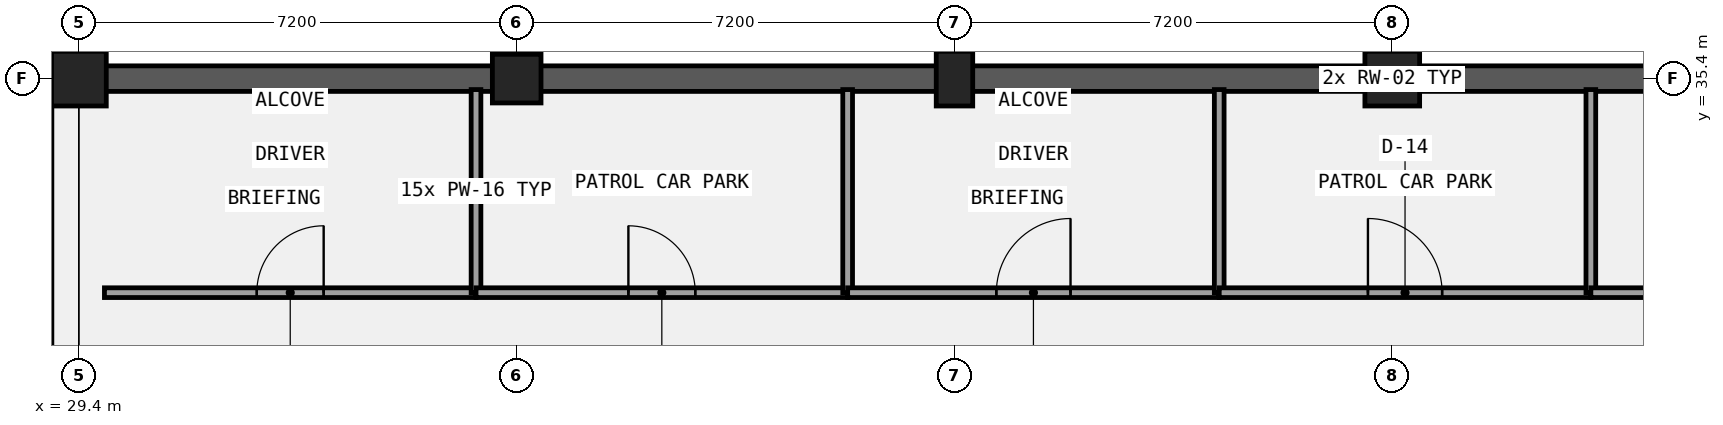
"""IFC4 building model, lengths in metres.
Left out: names, types, materials, properties, quantities, classifications, styles, units other than length and angle.
Written with IfcOpenShell. Run it as: python <this file> out.ifc"""

import sys

from ifc_helpers import new_model, si_unit, direction, frame, frame_2d, origin, origin_2d, place, context, subcontext, project, spatial, rectangle, extrude, element, fill, save


model = new_model("IFC4")
c1 = context("Model", 3, precision=1e-05, world=origin(), true_north=direction((0.0, 1.0)))
c2 = subcontext(c1, "Body", "Model", "MODEL_VIEW")
j1 = project(units=[si_unit("LENGTHUNIT", "METRE"), si_unit("PLANEANGLEUNIT", "RADIAN")], contexts=[c1])
p1 = place(None, origin())
s1 = spatial("IfcSite", under=j1, at=p1, CompositionType="ELEMENT")
p2 = place(p1, origin())
s2 = spatial("IfcBuilding", under=s1, at=p2, CompositionType="ELEMENT")
p3 = place(p2, frame((0.0, 0.0, -4.2)))
s3 = spatial("IfcBuildingStorey", under=s2, at=p3, CompositionType="ELEMENT", Elevation=-4.2)
p4 = place(p3, frame((29.19, 35.4, 0.0), z_axis=(0.0, 0.0, 1.0), x_axis=(1.0, 0.0, 0.0)))
e1 = element("IfcWall", 1, at=p4, inside=s3, PredefinedType="USERDEFINED", context=c2, shape_type="SweptSolid", body=[
    extrude(rectangle(XDim=43.62, YDim=0.42, at=frame_2d((21.81, 0.0))), origin(), (0.0, 0.0, 1.0), 3.03),
])
p5 = place(p3, frame((29.4, 56.8, 0.0), z_axis=(0.0, 0.0, 1.0), x_axis=(0.0, -1.0, 0.0)))
e2 = element("IfcWall", 2, at=p5, inside=s3, PredefinedType="USERDEFINED", context=c2, shape_type="SweptSolid", body=[
    extrude(rectangle(XDim=21.2, YDim=0.42, at=frame_2d((10.6, 0.0))), origin(), (0.0, 0.0, 1.0), 3.03),
])
p6 = place(p3, frame((29.4, 35.4, 0.0), z_axis=(0.0, 0.0, 1.0), x_axis=(1.0, 0.0, 0.0)))
e3 = element("IfcColumn", 3, at=p6, inside=s3, PredefinedType="COLUMN", context=c2, shape_type="SweptSolid", body=[
    extrude(rectangle(XDim=0.9, YDim=0.9, at=origin_2d()), origin(), (0.0, 0.0, 1.0), 4.2),
])
p7 = place(p3, frame((36.6, 35.4, 0.0), z_axis=(0.0, 0.0, 1.0), x_axis=(1.0, 0.0, 0.0)))
e4 = element("IfcColumn", 4, at=p7, inside=s3, PredefinedType="COLUMN", context=c2, shape_type="SweptSolid", body=[
    extrude(rectangle(XDim=0.8, YDim=0.8, at=origin_2d()), origin(), (0.0, 0.0, 1.0), 4.2),
])
p8 = place(p3, frame((43.8, 35.4, 0.0), z_axis=(0.0, 0.0, 1.0), x_axis=(1.0, 0.0, 0.0)))
e5 = element("IfcColumn", 5, at=p8, inside=s3, PredefinedType="COLUMN", context=c2, shape_type="SweptSolid", body=[
    extrude(rectangle(XDim=0.6, YDim=0.9, at=origin_2d()), origin(), (0.0, 0.0, 1.0), 4.2),
])
p9 = place(p3, frame((51.0, 35.4, 0.0), z_axis=(0.0, 0.0, 1.0), x_axis=(1.0, 0.0, 0.0)))
e6 = element("IfcColumn", 6, at=p9, inside=s3, PredefinedType="COLUMN", context=c2, shape_type="SweptSolid", body=[
    extrude(rectangle(XDim=0.9, YDim=0.9, at=origin_2d()), origin(), (0.0, 0.0, 1.0), 4.2),
])
p10 = place(p3, frame((29.82, 31.88, 0.0), z_axis=(0.0, 0.0, 1.0), x_axis=(1.0, 0.0, 0.0)))
e7 = element("IfcWall", 7, at=p10, inside=s3, PredefinedType="PARTITIONING", context=c2, shape_type="SweptSolid", body=[
    extrude(rectangle(XDim=6.111, YDim=0.16, at=frame_2d((3.055, 0.0))), origin(), (0.0, 0.0, 1.0), 3.33),
])
p11 = place(p10, frame((2.506, 0.0, 0.0)))
e8 = element("IfcOpeningElement", 8, at=p11, cuts=e7, PredefinedType="OPENING", context=c2, shape_type="SweptSolid", body=[
    extrude(rectangle(XDim=1.1, YDim=2.22, at=frame_2d((0.55, 1.11))), frame((0.0, 0.09, 0.0), z_axis=(0.0, -1.0, 0.0), x_axis=(1.0, 0.0, 0.0)), (0.0, 0.0, 1.0), 0.18),
])
p12 = place(p3, frame((35.931, 31.88, 0.0), z_axis=(0.0, 0.0, 1.0), x_axis=(0.0, 1.0, 0.0)))
e9 = element("IfcWall", 9, at=p12, inside=s3, PredefinedType="PARTITIONING", context=c2, shape_type="SweptSolid", body=[
    extrude(rectangle(XDim=3.34, YDim=0.16, at=frame_2d((1.67, 0.0))), origin(), (0.0, 0.0, 1.0), 3.88),
])
p13 = place(p3, frame((35.931, 31.88, 0.0), z_axis=(0.0, 0.0, 1.0), x_axis=(1.0, 0.0, 0.0)))
e10 = element("IfcWall", 10, at=p13, inside=s3, PredefinedType="PARTITIONING", context=c2, shape_type="SweptSolid", body=[
    extrude(rectangle(XDim=6.112, YDim=0.16, at=frame_2d((3.056, 0.0))), origin(), (0.0, 0.0, 1.0), 3.33),
])
p14 = place(p13, frame((2.506, 0.0, 0.0)))
e11 = element("IfcOpeningElement", 11, at=p14, cuts=e10, PredefinedType="OPENING", context=c2, shape_type="SweptSolid", body=[
    extrude(rectangle(XDim=1.1, YDim=2.35, at=frame_2d((0.55, 1.175))), frame((0.0, 0.09, 0.0), z_axis=(0.0, -1.0, 0.0), x_axis=(1.0, 0.0, 0.0)), (0.0, 0.0, 1.0), 0.18),
])
p15 = place(p3, frame((42.043, 31.88, 0.0), z_axis=(0.0, 0.0, 1.0), x_axis=(0.0, 1.0, 0.0)))
e12 = element("IfcWall", 12, at=p15, inside=s3, PredefinedType="PARTITIONING", context=c2, shape_type="SweptSolid", body=[
    extrude(rectangle(XDim=3.34, YDim=0.16, at=frame_2d((1.67, 0.0))), origin(), (0.0, 0.0, 1.0), 3.88),
])
p16 = place(p3, frame((42.043, 31.88, 0.0), z_axis=(0.0, 0.0, 1.0), x_axis=(1.0, 0.0, 0.0)))
e13 = element("IfcWall", 13, at=p16, inside=s3, PredefinedType="PARTITIONING", context=c2, shape_type="SweptSolid", body=[
    extrude(rectangle(XDim=6.111, YDim=0.16, at=frame_2d((3.056, 0.0))), origin(), (0.0, 0.0, 1.0), 3.33),
])
p17 = place(p16, frame((2.446, 0.0, 0.0)))
e14 = element("IfcOpeningElement", 14, at=p17, cuts=e13, PredefinedType="OPENING", context=c2, shape_type="SweptSolid", body=[
    extrude(rectangle(XDim=1.22, YDim=2.1, at=frame_2d((0.61, 1.05))), frame((0.0, 0.09, 0.0), z_axis=(0.0, -1.0, 0.0), x_axis=(1.0, 0.0, 0.0)), (0.0, 0.0, 1.0), 0.18),
])
p18 = place(p3, frame((48.154, 31.88, 0.0), z_axis=(0.0, 0.0, 1.0), x_axis=(0.0, 1.0, 0.0)))
e15 = element("IfcWall", 15, at=p18, inside=s3, PredefinedType="PARTITIONING", context=c2, shape_type="SweptSolid", body=[
    extrude(rectangle(XDim=3.34, YDim=0.16, at=frame_2d((1.67, 0.0))), origin(), (0.0, 0.0, 1.0), 3.88),
])
p19 = place(p3, frame((48.154, 31.88, 0.0), z_axis=(0.0, 0.0, 1.0), x_axis=(1.0, 0.0, 0.0)))
e16 = element("IfcWall", 16, at=p19, inside=s3, PredefinedType="PARTITIONING", context=c2, shape_type="SweptSolid", body=[
    extrude(rectangle(XDim=6.112, YDim=0.16, at=frame_2d((3.056, 0.0))), origin(), (0.0, 0.0, 1.0), 3.33),
])
p20 = place(p19, frame((2.446, 0.0, 0.0)))
e17 = element("IfcOpeningElement", 17, at=p20, cuts=e16, PredefinedType="OPENING", context=c2, shape_type="SweptSolid", body=[
    extrude(rectangle(XDim=1.22, YDim=2.22, at=frame_2d((0.61, 1.11))), frame((0.0, 0.09, 0.0), z_axis=(0.0, -1.0, 0.0), x_axis=(1.0, 0.0, 0.0)), (0.0, 0.0, 1.0), 0.18),
])
p21 = place(p3, frame((54.266, 31.88, 0.0), z_axis=(0.0, 0.0, 1.0), x_axis=(0.0, 1.0, 0.0)))
e18 = element("IfcWall", 18, at=p21, inside=s3, PredefinedType="PARTITIONING", context=c2, shape_type="SweptSolid", body=[
    extrude(rectangle(XDim=3.34, YDim=0.16, at=frame_2d((1.67, 0.0))), origin(), (0.0, 0.0, 1.0), 3.88),
])
p22 = place(p3, frame((54.266, 31.88, 0.0), z_axis=(0.0, 0.0, 1.0), x_axis=(1.0, 0.0, 0.0)))
e19 = element("IfcWall", 19, at=p22, inside=s3, PredefinedType="PARTITIONING", context=c2, shape_type="SweptSolid", body=[
    extrude(rectangle(XDim=6.111, YDim=0.16, at=frame_2d((3.055, 0.0))), origin(), (0.0, 0.0, 1.0), 3.33),
])
p23 = place(p22, frame((2.446, 0.0, 0.0)))
e20 = element("IfcOpeningElement", 20, at=p23, cuts=e19, PredefinedType="OPENING", context=c2, shape_type="SweptSolid", body=[
    extrude(rectangle(XDim=1.22, YDim=2.35, at=frame_2d((0.61, 1.175))), frame((0.0, 0.09, 0.0), z_axis=(0.0, -1.0, 0.0), x_axis=(1.0, 0.0, 0.0)), (0.0, 0.0, 1.0), 0.18),
])
p24 = place(p11, origin())
e21 = element("IfcDoor", 21, at=p24, inside=s3, OperationType="SINGLE_SWING_RIGHT", PredefinedType="DOOR", context=c2, shape_type="SweptSolid", body=[
    extrude(rectangle(XDim=1.1, YDim=2.22, at=frame_2d((0.55, 1.11))), frame((0.0, 0.025, 0.0), z_axis=(0.0, -1.0, 0.0), x_axis=(1.0, 0.0, 0.0)), (0.0, 0.0, 1.0), 0.05),
])
fill(e8, e21)
p25 = place(p14, origin())
e22 = element("IfcDoor", 22, at=p25, inside=s3, OperationType="SINGLE_SWING_LEFT", PredefinedType="DOOR", context=c2, shape_type="SweptSolid", body=[
    extrude(rectangle(XDim=1.1, YDim=2.35, at=frame_2d((0.55, 1.175))), frame((0.0, 0.025, 0.0), z_axis=(0.0, -1.0, 0.0), x_axis=(1.0, 0.0, 0.0)), (0.0, 0.0, 1.0), 0.05),
])
fill(e11, e22)
p26 = place(p17, origin())
e23 = element("IfcDoor", 23, at=p26, inside=s3, OperationType="SINGLE_SWING_RIGHT", PredefinedType="DOOR", context=c2, shape_type="SweptSolid", body=[
    extrude(rectangle(XDim=1.22, YDim=2.1, at=frame_2d((0.61, 1.05))), frame((0.0, 0.025, 0.0), z_axis=(0.0, -1.0, 0.0), x_axis=(1.0, 0.0, 0.0)), (0.0, 0.0, 1.0), 0.05),
])
fill(e14, e23)
p27 = place(p20, origin())
e24 = element("IfcDoor", 24, at=p27, inside=s3, OperationType="SINGLE_SWING_LEFT", PredefinedType="DOOR", context=c2, shape_type="SweptSolid", body=[
    extrude(rectangle(XDim=1.22, YDim=2.22, at=frame_2d((0.61, 1.11))), frame((0.0, 0.025, 0.0), z_axis=(0.0, -1.0, 0.0), x_axis=(1.0, 0.0, 0.0)), (0.0, 0.0, 1.0), 0.05),
])
fill(e17, e24)
save(model, sys.argv[1])
